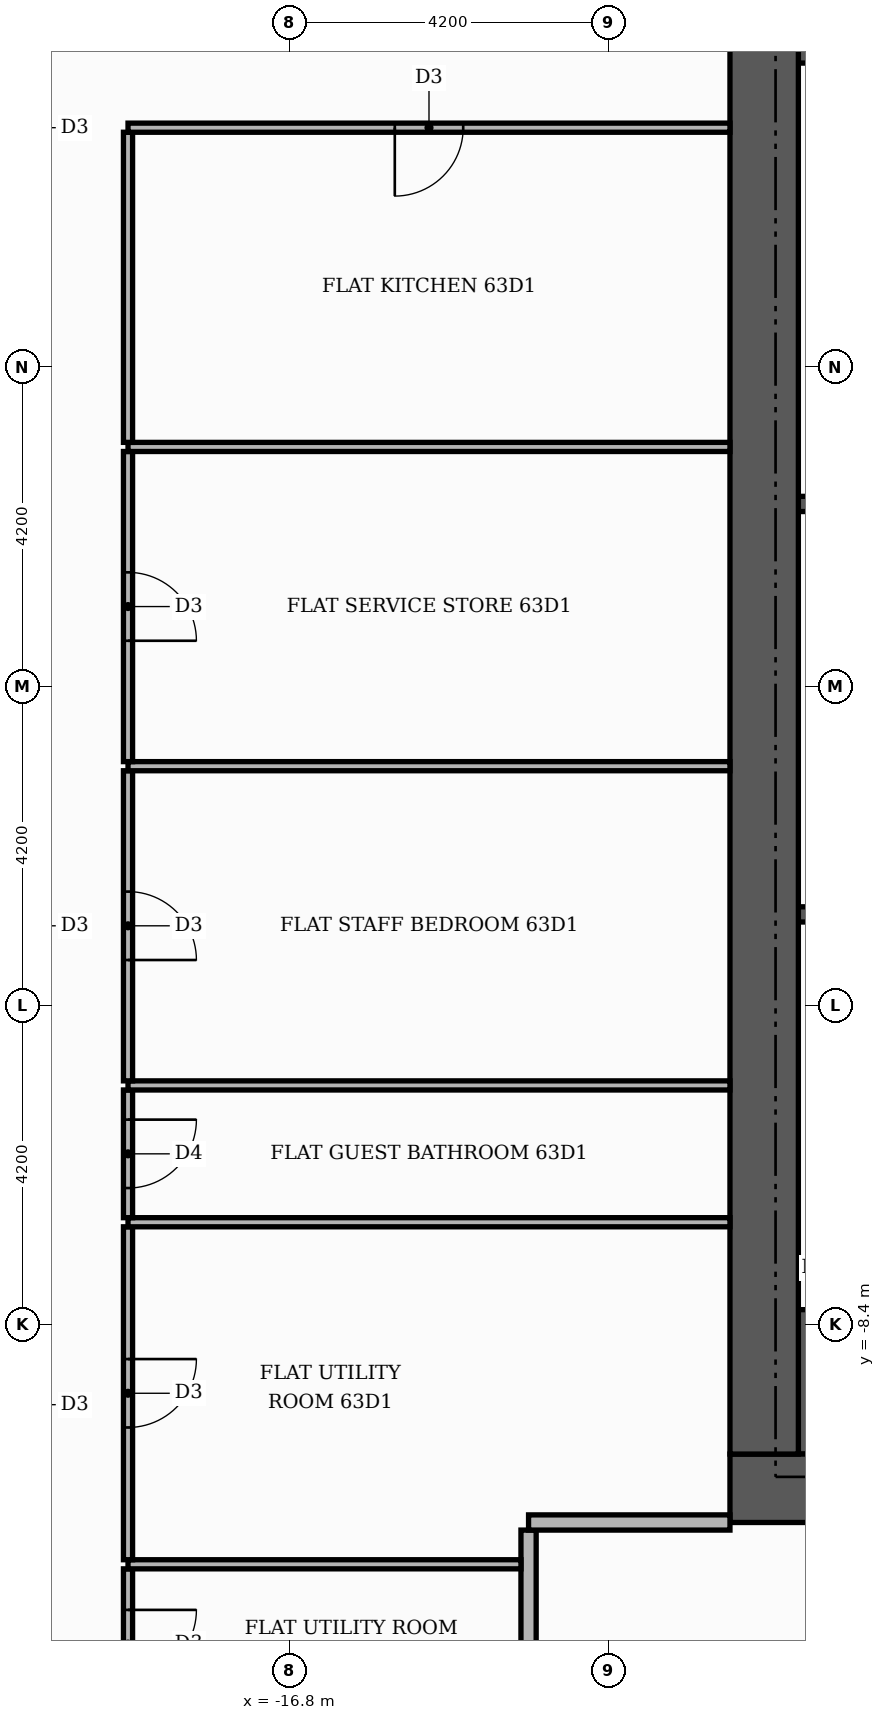
"""IFC4 building model, lengths in metres.
Left out: names, types, materials, properties, quantities, classifications, styles, units other than length and angle.
Written with IfcOpenShell. Run it as: python <this file> out.ifc"""

import sys

from ifc_helpers import new_model, si_unit, direction, frame, frame_2d, origin, place, context, subcontext, project, spatial, rectangle, extrude, element, fill, save


model = new_model("IFC4")
c1 = context("Model", 3, precision=1e-05, world=origin(), true_north=direction((0.0, 1.0)))
c2 = subcontext(c1, "Body", "Model", "MODEL_VIEW")
j1 = project(units=[si_unit("LENGTHUNIT", "METRE"), si_unit("PLANEANGLEUNIT", "RADIAN")], contexts=[c1])
p1 = place(None, origin())
s1 = spatial("IfcSite", under=j1, at=p1, CompositionType="ELEMENT")
p2 = place(p1, origin())
s2 = spatial("IfcBuilding", under=s1, at=p2, CompositionType="ELEMENT")
p3 = place(p2, frame((0.0, 0.0, 264.0)))
s3 = spatial("IfcBuildingStorey", under=s2, at=p3, CompositionType="ELEMENT", Elevation=264.0)
for number, where, z_axis, x_axis in (
    (1, (-10.1, -9.15, 0.0), (0.0, 0.0, 1.0), (1.0, 0.0, 0.0)),
    (2, (-10.1, 9.15, 0.0), (0.0, 0.0, 1.0), (1.0, 0.0, 0.0)),
):
    element("IfcWall", number, at=place(p3, frame(where, z_axis=z_axis, x_axis=x_axis)), inside=s3, PredefinedType="SHEAR", context=c2, shape_type="SweptSolid", body=[
        extrude(rectangle(XDim=4.6, YDim=1.9, at=frame_2d((2.3, 0.0))), origin(), (0.0, 0.0, 1.0), 3.48),
    ])
for number, where, z_axis, x_axis in (
    (3, (-10.1, -3.0, 0.0), (0.0, 0.0, 1.0), (1.0, 0.0, 0.0)),
    (4, (-10.1, 2.4, 0.0), (0.0, 0.0, 1.0), (1.0, 0.0, 0.0)),
):
    element("IfcWall", number, at=place(p3, frame(where, z_axis=z_axis, x_axis=x_axis)), inside=s3, PredefinedType="SHEAR", context=c2, shape_type="SweptSolid", body=[
        extrude(rectangle(XDim=0.9, YDim=0.2, at=frame_2d((0.45, 0.0))), origin(), (0.0, 0.0, 1.0), 3.48),
    ])
p4 = place(p3, frame((-11.0, -10.55, 0.0), z_axis=(0.0, 0.0, 1.0), x_axis=(1.0, 0.0, 0.0)))
e5 = element("IfcWall", 5, at=p4, inside=s3, PredefinedType="SHEAR", context=c2, shape_type="SweptSolid", body=[
    extrude(rectangle(XDim=22.0, YDim=0.9, at=frame_2d((11.0, 0.0))), origin(), (0.0, 0.0, 1.0), 3.48),
])
p5 = place(p4, frame((7.4, 0.0, 0.0)))
e6 = element("IfcOpeningElement", 6, at=p5, cuts=e5, PredefinedType="OPENING", context=c2, shape_type="SweptSolid", body=[
    extrude(rectangle(XDim=1.8, YDim=2.2, at=frame_2d((0.9, 1.1))), frame((0.0, 0.46, 0.0), z_axis=(0.0, -1.0, 0.0), x_axis=(1.0, 0.0, 0.0)), (0.0, 0.0, 1.0), 0.92),
])
p6 = place(p3, frame((-10.55, -10.1, 0.0), z_axis=(0.0, 0.0, 1.0), x_axis=(0.0, 1.0, 0.0)))
e7 = element("IfcWall", 7, at=p6, inside=s3, PredefinedType="SHEAR", context=c2, shape_type="SweptSolid", body=[
    extrude(rectangle(XDim=20.2, YDim=0.9, at=frame_2d((10.1, 0.0))), origin(), (0.0, 0.0, 1.0), 3.48),
])
p7 = place(p3, frame((-18.92, -13.55, 0.0), z_axis=(0.0, 0.0, 1.0), x_axis=(0.0, 1.0, 0.0)))
e8 = element("IfcWall", 8, at=p7, inside=s3, PredefinedType="PARTITIONING", context=c2, shape_type="SweptSolid", body=[
    extrude(rectangle(XDim=1.94, YDim=0.12, at=frame_2d((0.97, 0.0))), origin(), (0.0, 0.0, 1.0), 3.48),
])
p8 = place(p7, frame((0.5, 0.0, 0.0)))
e9 = element("IfcOpeningElement", 9, at=p8, cuts=e8, PredefinedType="OPENING", context=c2, shape_type="SweptSolid", body=[
    extrude(rectangle(XDim=0.9, YDim=2.1, at=frame_2d((0.45, 1.05))), frame((0.0, 0.07, 0.0), z_axis=(0.0, -1.0, 0.0), x_axis=(1.0, 0.0, 0.0)), (0.0, 0.0, 1.0), 0.14),
])
p9 = place(p3, frame((-13.65, -13.55, 0.0), z_axis=(0.0, 0.0, 1.0), x_axis=(0.0, 1.0, 0.0)))
e10 = element("IfcWall", 10, at=p9, inside=s3, PredefinedType="PARTITIONING", context=c2, shape_type="SweptSolid", body=[
    extrude(rectangle(XDim=2.45, YDim=0.2, at=frame_2d((1.225, 0.0))), origin(), (0.0, 0.0, 1.0), 3.48),
])
p10 = place(p3, frame((-18.92, -11.55, 0.0), z_axis=(0.0, 0.0, 1.0), x_axis=(1.0, 0.0, 0.0)))
e11 = element("IfcWall", 11, at=p10, inside=s3, PredefinedType="PARTITIONING", context=c2, shape_type="SweptSolid", body=[
    extrude(rectangle(XDim=5.17, YDim=0.12, at=frame_2d((2.585, 0.0))), origin(), (0.0, 0.0, 1.0), 3.48),
])
p11 = place(p3, frame((-18.92, -11.49, 0.0), z_axis=(0.0, 0.0, 1.0), x_axis=(0.0, 1.0, 0.0)))
e12 = element("IfcWall", 12, at=p11, inside=s3, PredefinedType="PARTITIONING", context=c2, shape_type="SweptSolid", body=[
    extrude(rectangle(XDim=4.38, YDim=0.12, at=frame_2d((2.19, 0.0))), origin(), (0.0, 0.0, 1.0), 3.48),
])
p12 = place(p11, frame((1.74, 0.0, 0.0)))
e13 = element("IfcOpeningElement", 13, at=p12, cuts=e12, PredefinedType="OPENING", context=c2, shape_type="SweptSolid", body=[
    extrude(rectangle(XDim=0.9, YDim=2.1, at=frame_2d((0.45, 1.05))), frame((0.0, 0.07, 0.0), z_axis=(0.0, -1.0, 0.0), x_axis=(1.0, 0.0, 0.0)), (0.0, 0.0, 1.0), 0.14),
])
p13 = place(p3, frame((-13.65, -11.0, 0.0), z_axis=(0.0, 0.0, 1.0), x_axis=(1.0, 0.0, 0.0)))
e14 = element("IfcWall", 14, at=p13, inside=s3, PredefinedType="PARTITIONING", context=c2, shape_type="SweptSolid", body=[
    extrude(rectangle(XDim=2.65, YDim=0.2, at=frame_2d((1.325, 0.0))), origin(), (0.0, 0.0, 1.0), 3.48),
])
p14 = place(p3, frame((-18.92, -7.05, 0.0), z_axis=(0.0, 0.0, 1.0), x_axis=(1.0, 0.0, 0.0)))
e15 = element("IfcWall", 15, at=p14, inside=s3, PredefinedType="PARTITIONING", context=c2, shape_type="SweptSolid", body=[
    extrude(rectangle(XDim=7.92, YDim=0.12, at=frame_2d((3.96, 0.0))), origin(), (0.0, 0.0, 1.0), 3.48),
])
p15 = place(p3, frame((-18.92, -6.99, 0.0), z_axis=(0.0, 0.0, 1.0), x_axis=(0.0, 1.0, 0.0)))
e16 = element("IfcWall", 16, at=p15, inside=s3, PredefinedType="PARTITIONING", context=c2, shape_type="SweptSolid", body=[
    extrude(rectangle(XDim=1.68, YDim=0.12, at=frame_2d((0.84, 0.0))), origin(), (0.0, 0.0, 1.0), 3.48),
])
p16 = place(p15, frame((0.39, 0.0, 0.0)))
e17 = element("IfcOpeningElement", 17, at=p16, cuts=e16, PredefinedType="OPENING", context=c2, shape_type="SweptSolid", body=[
    extrude(rectangle(XDim=0.9, YDim=2.1, at=frame_2d((0.45, 1.05))), frame((0.0, 0.07, 0.0), z_axis=(0.0, -1.0, 0.0), x_axis=(1.0, 0.0, 0.0)), (0.0, 0.0, 1.0), 0.14),
])
p17 = place(p3, frame((-18.92, -5.25, 0.0), z_axis=(0.0, 0.0, 1.0), x_axis=(1.0, 0.0, 0.0)))
e18 = element("IfcWall", 18, at=p17, inside=s3, PredefinedType="PARTITIONING", context=c2, shape_type="SweptSolid", body=[
    extrude(rectangle(XDim=7.92, YDim=0.12, at=frame_2d((3.96, 0.0))), origin(), (0.0, 0.0, 1.0), 3.48),
])
p18 = place(p3, frame((-18.92, -5.19, 0.0), z_axis=(0.0, 0.0, 1.0), x_axis=(0.0, 1.0, 0.0)))
e19 = element("IfcWall", 19, at=p18, inside=s3, PredefinedType="PARTITIONING", context=c2, shape_type="SweptSolid", body=[
    extrude(rectangle(XDim=4.08, YDim=0.12, at=frame_2d((2.04, 0.0))), origin(), (0.0, 0.0, 1.0), 3.48),
])
p19 = place(p18, frame((1.59, 0.0, 0.0)))
e20 = element("IfcOpeningElement", 20, at=p19, cuts=e19, PredefinedType="OPENING", context=c2, shape_type="SweptSolid", body=[
    extrude(rectangle(XDim=0.9, YDim=2.1, at=frame_2d((0.45, 1.05))), frame((0.0, 0.07, 0.0), z_axis=(0.0, -1.0, 0.0), x_axis=(1.0, 0.0, 0.0)), (0.0, 0.0, 1.0), 0.14),
])
p20 = place(p3, frame((-18.92, -1.05, 0.0), z_axis=(0.0, 0.0, 1.0), x_axis=(1.0, 0.0, 0.0)))
e21 = element("IfcWall", 21, at=p20, inside=s3, PredefinedType="PARTITIONING", context=c2, shape_type="SweptSolid", body=[
    extrude(rectangle(XDim=7.92, YDim=0.12, at=frame_2d((3.96, 0.0))), origin(), (0.0, 0.0, 1.0), 3.48),
])
p21 = place(p3, frame((-18.92, -0.99, 0.0), z_axis=(0.0, 0.0, 1.0), x_axis=(0.0, 1.0, 0.0)))
e22 = element("IfcWall", 22, at=p21, inside=s3, PredefinedType="PARTITIONING", context=c2, shape_type="SweptSolid", body=[
    extrude(rectangle(XDim=4.08, YDim=0.12, at=frame_2d((2.04, 0.0))), origin(), (0.0, 0.0, 1.0), 3.48),
])
p22 = place(p21, frame((1.59, 0.0, 0.0)))
e23 = element("IfcOpeningElement", 23, at=p22, cuts=e22, PredefinedType="OPENING", context=c2, shape_type="SweptSolid", body=[
    extrude(rectangle(XDim=0.9, YDim=2.1, at=frame_2d((0.45, 1.05))), frame((0.0, 0.07, 0.0), z_axis=(0.0, -1.0, 0.0), x_axis=(1.0, 0.0, 0.0)), (0.0, 0.0, 1.0), 0.14),
])
p23 = place(p3, frame((-18.92, 3.15, 0.0), z_axis=(0.0, 0.0, 1.0), x_axis=(1.0, 0.0, 0.0)))
e24 = element("IfcWall", 24, at=p23, inside=s3, PredefinedType="PARTITIONING", context=c2, shape_type="SweptSolid", body=[
    extrude(rectangle(XDim=7.92, YDim=0.12, at=frame_2d((3.96, 0.0))), origin(), (0.0, 0.0, 1.0), 3.48),
])
p24 = place(p3, frame((-18.92, 3.21, 0.0), z_axis=(0.0, 0.0, 1.0), x_axis=(0.0, 1.0, 0.0)))
e25 = element("IfcWall", 25, at=p24, inside=s3, PredefinedType="PARTITIONING", context=c2, shape_type="SweptSolid", body=[
    extrude(rectangle(XDim=4.08, YDim=0.12, at=frame_2d((2.04, 0.0))), origin(), (0.0, 0.0, 1.0), 3.48),
])
p25 = place(p3, frame((-18.92, 7.35, 0.0), z_axis=(0.0, 0.0, 1.0), x_axis=(1.0, 0.0, 0.0)))
e26 = element("IfcWall", 26, at=p25, inside=s3, PredefinedType="PARTITIONING", context=c2, shape_type="SweptSolid", body=[
    extrude(rectangle(XDim=7.92, YDim=0.12, at=frame_2d((3.96, 0.0))), origin(), (0.0, 0.0, 1.0), 3.48),
])
p26 = place(p25, frame((3.51, 0.0, 0.0)))
e27 = element("IfcOpeningElement", 27, at=p26, cuts=e26, PredefinedType="OPENING", context=c2, shape_type="SweptSolid", body=[
    extrude(rectangle(XDim=0.9, YDim=2.1, at=frame_2d((0.45, 1.05))), frame((0.0, 0.07, 0.0), z_axis=(0.0, -1.0, 0.0), x_axis=(1.0, 0.0, 0.0)), (0.0, 0.0, 1.0), 0.14),
])
p27 = place(p26, frame((0.9, 0.0, 0.0), z_axis=(0.0, 0.0, 1.0), x_axis=(-1.0, 0.0, 0.0)))
e28 = element("IfcDoor", 28, at=p27, inside=s3, OperationType="SINGLE_SWING_LEFT", PredefinedType="DOOR", context=c2, shape_type="SweptSolid", body=[
    extrude(rectangle(XDim=0.9, YDim=2.1, at=frame_2d((0.45, 1.05))), frame((0.0, 0.025, 0.0), z_axis=(0.0, -1.0, 0.0), x_axis=(1.0, 0.0, 0.0)), (0.0, 0.0, 1.0), 0.05),
])
fill(e27, e28)
p28 = place(p22, frame((0.9, 0.0, 0.0), z_axis=(0.0, 0.0, 1.0), x_axis=(-1.0, 0.0, 0.0)))
e29 = element("IfcDoor", 29, at=p28, inside=s3, OperationType="SINGLE_SWING_LEFT", PredefinedType="DOOR", context=c2, shape_type="SweptSolid", body=[
    extrude(rectangle(XDim=0.9, YDim=2.1, at=frame_2d((0.45, 1.05))), frame((0.0, 0.025, 0.0), z_axis=(0.0, -1.0, 0.0), x_axis=(1.0, 0.0, 0.0)), (0.0, 0.0, 1.0), 0.05),
])
fill(e23, e29)
p29 = place(p19, frame((0.9, 0.0, 0.0), z_axis=(0.0, 0.0, 1.0), x_axis=(-1.0, 0.0, 0.0)))
e30 = element("IfcDoor", 30, at=p29, inside=s3, OperationType="SINGLE_SWING_LEFT", PredefinedType="DOOR", context=c2, shape_type="SweptSolid", body=[
    extrude(rectangle(XDim=0.9, YDim=2.1, at=frame_2d((0.45, 1.05))), frame((0.0, 0.025, 0.0), z_axis=(0.0, -1.0, 0.0), x_axis=(1.0, 0.0, 0.0)), (0.0, 0.0, 1.0), 0.05),
])
fill(e20, e30)
p30 = place(p16, frame((0.9, 0.0, 0.0), z_axis=(0.0, 0.0, 1.0), x_axis=(-1.0, 0.0, 0.0)))
e31 = element("IfcDoor", 31, at=p30, inside=s3, OperationType="SINGLE_SWING_RIGHT", PredefinedType="DOOR", context=c2, shape_type="SweptSolid", body=[
    extrude(rectangle(XDim=0.9, YDim=2.1, at=frame_2d((0.45, 1.05))), frame((0.0, 0.025, 0.0), z_axis=(0.0, -1.0, 0.0), x_axis=(1.0, 0.0, 0.0)), (0.0, 0.0, 1.0), 0.05),
])
fill(e17, e31)
p31 = place(p12, frame((0.9, 0.0, 0.0), z_axis=(0.0, 0.0, 1.0), x_axis=(-1.0, 0.0, 0.0)))
e32 = element("IfcDoor", 32, at=p31, inside=s3, OperationType="SINGLE_SWING_RIGHT", PredefinedType="DOOR", context=c2, shape_type="SweptSolid", body=[
    extrude(rectangle(XDim=0.9, YDim=2.1, at=frame_2d((0.45, 1.05))), frame((0.0, 0.025, 0.0), z_axis=(0.0, -1.0, 0.0), x_axis=(1.0, 0.0, 0.0)), (0.0, 0.0, 1.0), 0.05),
])
fill(e13, e32)
p32 = place(p8, frame((0.9, 0.0, 0.0), z_axis=(0.0, 0.0, 1.0), x_axis=(-1.0, 0.0, 0.0)))
e33 = element("IfcDoor", 33, at=p32, inside=s3, OperationType="SINGLE_SWING_RIGHT", PredefinedType="DOOR", context=c2, shape_type="SweptSolid", body=[
    extrude(rectangle(XDim=0.9, YDim=2.1, at=frame_2d((0.45, 1.05))), frame((0.0, 0.025, 0.0), z_axis=(0.0, -1.0, 0.0), x_axis=(1.0, 0.0, 0.0)), (0.0, 0.0, 1.0), 0.05),
])
fill(e9, e33)
save(model, sys.argv[1])
